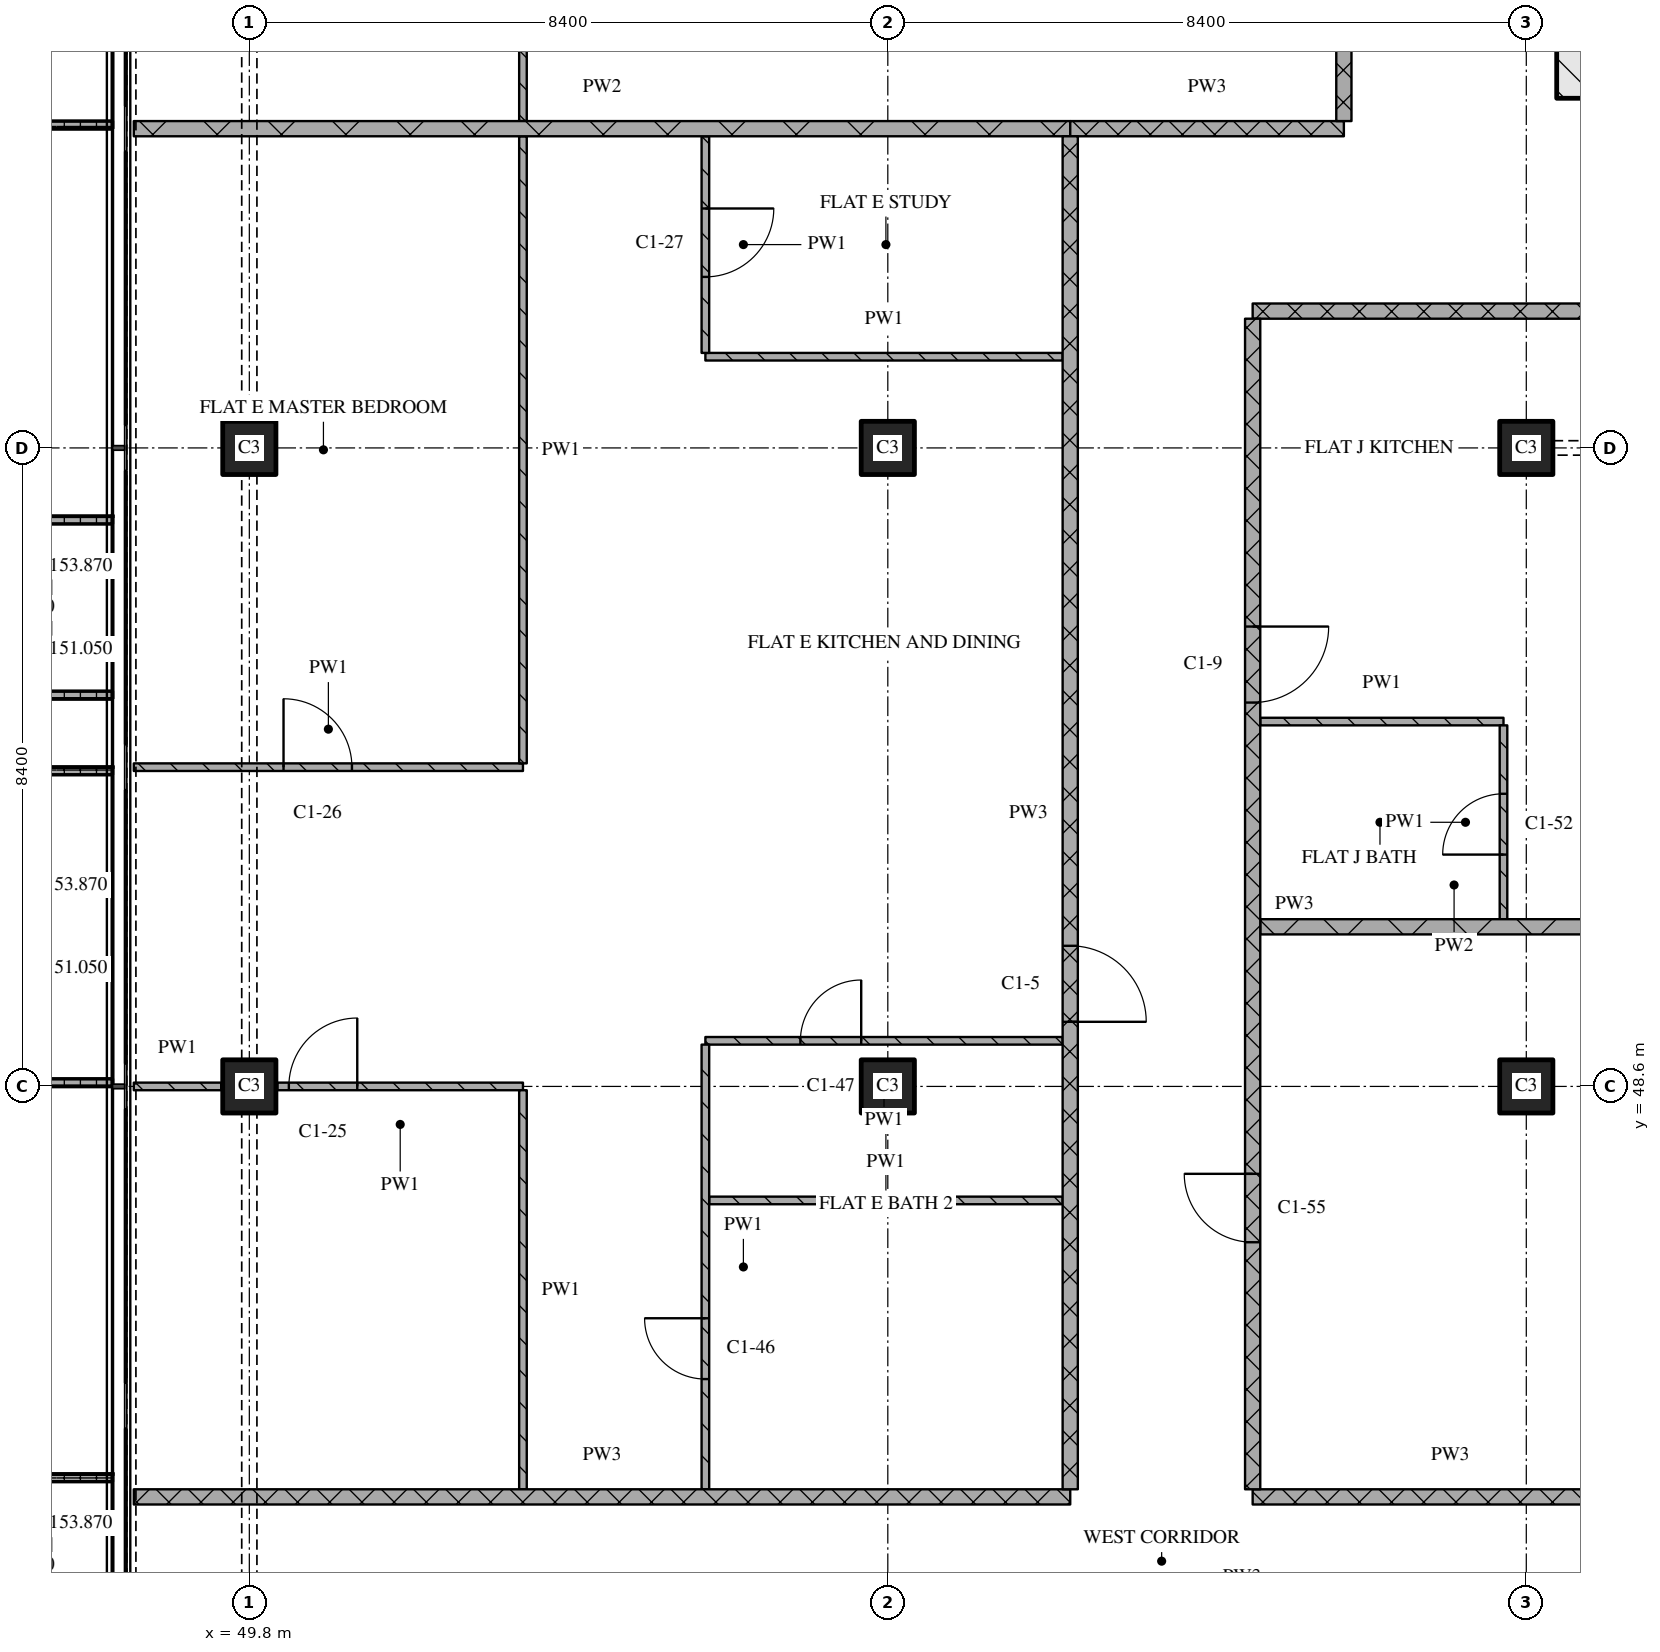
"""IFC4 building model, lengths in metres.
Left out: names, types, materials, properties, quantities, classifications, styles, units other than length and angle.
Written with IfcOpenShell. Run it as: python <this file> out.ifc"""

import sys

from ifc_helpers import new_model, si_unit, direction, frame, frame_2d, origin, origin_2d, place, context, subcontext, project, spatial, polyline, rectangle, outline, extrude, element, fill, save


model = new_model("IFC4")
c1 = context("Model", 3, precision=1e-05, world=origin(), true_north=direction((0.0, 1.0)))
c2 = subcontext(c1, "Body", "Model", "MODEL_VIEW")
j1 = project(units=[si_unit("LENGTHUNIT", "METRE"), si_unit("PLANEANGLEUNIT", "RADIAN")], contexts=[c1])
p1 = place(None, origin())
s1 = spatial("IfcSite", under=j1, at=p1, CompositionType="ELEMENT")
p2 = place(p1, origin())
s2 = spatial("IfcBuilding", under=s1, at=p2, CompositionType="ELEMENT")
p3 = place(p2, frame((0.0, 0.0, 151.05)))
s3 = spatial("IfcBuildingStorey", under=s2, at=p3, CompositionType="ELEMENT", Elevation=151.05)
for number, where, z_axis, x_axis in (
    (1, (49.8, 48.6, 0.0), (0.0, 0.0, 1.0), (1.0, 0.0, 0.0)),
    (2, (49.8, 57.0, 0.0), (0.0, 0.0, 1.0), (1.0, 0.0, 0.0)),
    (3, (58.2, 48.6, 0.0), (0.0, 0.0, 1.0), (1.0, 0.0, 0.0)),
    (4, (58.2, 57.0, 0.0), (0.0, 0.0, 1.0), (1.0, 0.0, 0.0)),
    (5, (66.6, 48.6, 0.0), (0.0, 0.0, 1.0), (1.0, 0.0, 0.0)),
    (6, (66.6, 57.0, 0.0), (0.0, 0.0, 1.0), (1.0, 0.0, 0.0)),
):
    element("IfcColumn", number, at=place(p3, frame(where, z_axis=z_axis, x_axis=x_axis)), inside=s3, PredefinedType="COLUMN", context=c2, shape_type="SweptSolid", body=[
        extrude(rectangle(XDim=0.7, YDim=0.7, at=origin_2d()), origin(), (0.0, 0.0, 1.0), 3.6),
    ])
p4 = place(p3, origin())
e7 = element("IfcWall", 7, at=p4, inside=s3, PredefinedType="SOLIDWALL", context=c2, shape_type="SweptSolid", body=[
    extrude(outline(polyline([(48.0, 65.4), (48.0, 65.3), (46.367, 65.3), (46.367, 61.3), (48.0, 61.3), (48.0, 61.2), (46.267, 61.2), (46.267, 65.4), (48.0, 65.4)])), origin(), (0.0, 0.0, 1.0), 1.0),
])
p5 = place(p3, origin())
e8 = element("IfcWall", 8, at=p5, inside=s3, PredefinedType="SOLIDWALL", context=c2, shape_type="SweptSolid", body=[
    extrude(outline(polyline([(48.0, 56.1), (48.0, 56.0), (46.5, 56.0), (46.5, 53.8), (48.0, 53.8), (48.0, 53.7), (46.4, 53.7), (46.4, 56.1), (48.0, 56.1)])), origin(), (0.0, 0.0, 1.0), 1.0),
])
p6 = place(p3, origin())
e9 = element("IfcWall", 9, at=p6, inside=s3, PredefinedType="SOLIDWALL", context=c2, shape_type="SweptSolid", body=[
    extrude(outline(polyline([(48.0, 52.8), (48.0, 52.7), (46.367, 52.7), (46.367, 48.7), (48.0, 48.7), (48.0, 48.6), (46.267, 48.6), (46.267, 52.8), (48.0, 52.8)])), origin(), (0.0, 0.0, 1.0), 1.0),
])
p7 = place(p3, origin())
e10 = element("IfcWall", 10, at=p7, inside=s3, PredefinedType="SOLIDWALL", context=c2, shape_type="SweptSolid", body=[
    extrude(outline(polyline([(48.0, 43.5), (48.0, 43.4), (46.5, 43.4), (46.5, 41.2), (48.0, 41.2), (48.0, 41.1), (46.4, 41.1), (46.4, 43.5), (48.0, 43.5)])), origin(), (0.0, 0.0, 1.0), 1.0),
])
p8 = place(p3, frame((67.0, 62.0, 0.0), z_axis=(0.0, 0.0, 1.0), x_axis=(1.0, 0.0, 0.0)))
e11 = element("IfcWall", 11, at=p8, inside=s3, PredefinedType="SOLIDWALL", context=c2, shape_type="SweptSolid", body=[
    extrude(rectangle(XDim=41.2, YDim=0.8, at=frame_2d((20.6, 0.0))), origin(), (0.0, 0.0, 1.0), 3.32),
])
p9 = place(p8, frame((20.95, 0.0, 0.0)))
e12 = element("IfcOpeningElement", 12, at=p9, cuts=e11, PredefinedType="OPENING", context=c2, shape_type="SweptSolid", body=[
    extrude(rectangle(XDim=1.8, YDim=2.1, at=frame_2d((0.9, 1.05))), frame((0.0, 0.41, 0.0), z_axis=(0.0, -1.0, 0.0), x_axis=(1.0, 0.0, 0.0)), (0.0, 0.0, 1.0), 0.82),
])
p10 = place(p3, frame((48.28, 43.2, 0.0), z_axis=(0.0, 0.0, 1.0), x_axis=(1.0, 0.0, 0.0)))
e13 = element("IfcWall", 13, at=p10, inside=s3, PredefinedType="PARTITIONING", context=c2, shape_type="SweptSolid", body=[
    extrude(rectangle(XDim=12.32, YDim=0.2, at=frame_2d((6.16, 0.0))), origin(), (0.0, 0.0, 1.0), 3.32),
])
p11 = place(p3, frame((63.0, 43.2, 0.0), z_axis=(0.0, 0.0, 1.0), x_axis=(1.0, 0.0, 0.0)))
e14 = element("IfcWall", 14, at=p11, inside=s3, PredefinedType="PARTITIONING", context=c2, shape_type="SweptSolid", body=[
    extrude(rectangle(XDim=5.2, YDim=0.2, at=frame_2d((2.6, 0.0))), origin(), (0.0, 0.0, 1.0), 3.32),
])
p12 = place(p3, frame((55.85, 47.1, 0.0), z_axis=(0.0, 0.0, 1.0), x_axis=(1.0, 0.0, 0.0)))
e15 = element("IfcWall", 15, at=p12, inside=s3, PredefinedType="PARTITIONING", context=c2, shape_type="SweptSolid", body=[
    extrude(rectangle(XDim=4.65, YDim=0.1, at=frame_2d((2.325, 0.0))), origin(), (0.0, 0.0, 1.0), 3.32),
])
p13 = place(p3, frame((48.28, 48.6, 0.0), z_axis=(0.0, 0.0, 1.0), x_axis=(1.0, 0.0, 0.0)))
e16 = element("IfcWall", 16, at=p13, inside=s3, PredefinedType="PARTITIONING", context=c2, shape_type="SweptSolid", body=[
    extrude(rectangle(XDim=1.15, YDim=0.1, at=frame_2d((0.575, 0.0))), origin(), (0.0, 0.0, 1.0), 3.32),
])
p14 = place(p3, frame((53.4, 48.6, 0.0), z_axis=(0.0, 0.0, 1.0), x_axis=(-1.0, 0.0, 0.0)))
e17 = element("IfcWall", 17, at=p14, inside=s3, PredefinedType="PARTITIONING", context=c2, shape_type="SweptSolid", body=[
    extrude(rectangle(XDim=3.23, YDim=0.1, at=frame_2d((1.615, 0.0))), origin(), (0.0, 0.0, 1.0), 3.32),
])
p15 = place(p14, frame((2.18, 0.0, 0.0)))
e18 = element("IfcOpeningElement", 18, at=p15, cuts=e17, PredefinedType="OPENING", context=c2, shape_type="SweptSolid", body=[
    extrude(rectangle(XDim=0.9, YDim=2.1, at=frame_2d((0.45, 1.05))), frame((0.0, 0.06, 0.0), z_axis=(0.0, -1.0, 0.0), x_axis=(1.0, 0.0, 0.0)), (0.0, 0.0, 1.0), 0.12),
])
p16 = place(p3, frame((60.5, 49.2, 0.0), z_axis=(0.0, 0.0, 1.0), x_axis=(-1.0, 0.0, 0.0)))
e19 = element("IfcWall", 19, at=p16, inside=s3, PredefinedType="PARTITIONING", context=c2, shape_type="SweptSolid", body=[
    extrude(rectangle(XDim=4.7, YDim=0.1, at=frame_2d((2.35, 0.0))), origin(), (0.0, 0.0, 1.0), 3.32),
])
p17 = place(p16, frame((2.65, 0.0, 0.0)))
e20 = element("IfcOpeningElement", 20, at=p17, cuts=e19, PredefinedType="OPENING", context=c2, shape_type="SweptSolid", body=[
    extrude(rectangle(XDim=0.8, YDim=2.1, at=frame_2d((0.4, 1.05))), frame((0.0, 0.06, 0.0), z_axis=(0.0, -1.0, 0.0), x_axis=(1.0, 0.0, 0.0)), (0.0, 0.0, 1.0), 0.12),
])
p18 = place(p3, frame((63.1, 50.7, 0.0), z_axis=(0.0, 0.0, 1.0), x_axis=(1.0, 0.0, 0.0)))
e21 = element("IfcWall", 21, at=p18, inside=s3, PredefinedType="PARTITIONING", context=c2, shape_type="SweptSolid", body=[
    extrude(rectangle(XDim=5.1, YDim=0.2, at=frame_2d((2.55, 0.0))), origin(), (0.0, 0.0, 1.0), 3.32),
])
p19 = place(p3, frame((48.28, 52.8, 0.0), z_axis=(0.0, 0.0, 1.0), x_axis=(1.0, 0.0, 0.0)))
e22 = element("IfcWall", 22, at=p19, inside=s3, PredefinedType="PARTITIONING", context=c2, shape_type="SweptSolid", body=[
    extrude(rectangle(XDim=5.12, YDim=0.1, at=frame_2d((2.56, 0.0))), origin(), (0.0, 0.0, 1.0), 3.32),
])
p20 = place(p19, frame((1.97, 0.0, 0.0)))
e23 = element("IfcOpeningElement", 23, at=p20, cuts=e22, PredefinedType="OPENING", context=c2, shape_type="SweptSolid", body=[
    extrude(rectangle(XDim=0.9, YDim=2.1, at=frame_2d((0.45, 1.05))), frame((0.0, 0.06, 0.0), z_axis=(0.0, -1.0, 0.0), x_axis=(1.0, 0.0, 0.0)), (0.0, 0.0, 1.0), 0.12),
])
p21 = place(p3, frame((63.1, 53.4, 0.0), z_axis=(0.0, 0.0, 1.0), x_axis=(1.0, 0.0, 0.0)))
e24 = element("IfcWall", 24, at=p21, inside=s3, PredefinedType="PARTITIONING", context=c2, shape_type="SweptSolid", body=[
    extrude(rectangle(XDim=3.2, YDim=0.1, at=frame_2d((1.6, 0.0))), origin(), (0.0, 0.0, 1.0), 3.32),
])
p22 = place(p3, frame((55.8, 58.2, 0.0), z_axis=(0.0, 0.0, 1.0), x_axis=(1.0, 0.0, 0.0)))
e25 = element("IfcWall", 25, at=p22, inside=s3, PredefinedType="PARTITIONING", context=c2, shape_type="SweptSolid", body=[
    extrude(rectangle(XDim=4.7, YDim=0.1, at=frame_2d((2.35, 0.0))), origin(), (0.0, 0.0, 1.0), 3.32),
])
p23 = place(p3, frame((63.0, 58.8, 0.0), z_axis=(0.0, 0.0, 1.0), x_axis=(1.0, 0.0, 0.0)))
e26 = element("IfcWall", 26, at=p23, inside=s3, PredefinedType="PARTITIONING", context=c2, shape_type="SweptSolid", body=[
    extrude(rectangle(XDim=10.8, YDim=0.2, at=frame_2d((5.4, 0.0))), origin(), (0.0, 0.0, 1.0), 3.32),
])
p24 = place(p3, frame((60.6, 61.2, 0.0), z_axis=(0.0, 0.0, 1.0), x_axis=(1.0, 0.0, 0.0)))
e27 = element("IfcWall", 27, at=p24, inside=s3, PredefinedType="PARTITIONING", context=c2, shape_type="SweptSolid", body=[
    extrude(rectangle(XDim=3.6, YDim=0.2, at=frame_2d((1.8, 0.0))), origin(), (0.0, 0.0, 1.0), 3.32),
])
p25 = place(p3, frame((48.28, 61.2, 0.0), z_axis=(0.0, 0.0, 1.0), x_axis=(1.0, 0.0, 0.0)))
e28 = element("IfcWall", 28, at=p25, inside=s3, PredefinedType="PARTITIONING", context=c2, shape_type="SweptSolid", body=[
    extrude(rectangle(XDim=12.32, YDim=0.2, at=frame_2d((6.16, 0.0))), origin(), (0.0, 0.0, 1.0), 3.32),
])
p26 = place(p3, frame((53.4, 48.55, 0.0), z_axis=(0.0, 0.0, 1.0), x_axis=(0.0, -1.0, 0.0)))
e29 = element("IfcWall", 29, at=p26, inside=s3, PredefinedType="PARTITIONING", context=c2, shape_type="SweptSolid", body=[
    extrude(rectangle(XDim=5.25, YDim=0.1, at=frame_2d((2.625, 0.0))), origin(), (0.0, 0.0, 1.0), 3.32),
])
p27 = place(p3, frame((55.8, 49.15, 0.0), z_axis=(0.0, 0.0, 1.0), x_axis=(0.0, -1.0, 0.0)))
e30 = element("IfcWall", 30, at=p27, inside=s3, PredefinedType="PARTITIONING", context=c2, shape_type="SweptSolid", body=[
    extrude(rectangle(XDim=5.85, YDim=0.1, at=frame_2d((2.925, 0.0))), origin(), (0.0, 0.0, 1.0), 3.32),
])
p28 = place(p27, frame((3.6, 0.0, 0.0)))
e31 = element("IfcOpeningElement", 31, at=p28, cuts=e30, PredefinedType="OPENING", context=c2, shape_type="SweptSolid", body=[
    extrude(rectangle(XDim=0.8, YDim=2.1, at=frame_2d((0.4, 1.05))), frame((0.0, 0.06, 0.0), z_axis=(0.0, -1.0, 0.0), x_axis=(1.0, 0.0, 0.0)), (0.0, 0.0, 1.0), 0.12),
])
p29 = place(p3, frame((55.8, 61.1, 0.0), z_axis=(0.0, 0.0, 1.0), x_axis=(0.0, -1.0, 0.0)))
e32 = element("IfcWall", 32, at=p29, inside=s3, PredefinedType="PARTITIONING", context=c2, shape_type="SweptSolid", body=[
    extrude(rectangle(XDim=2.85, YDim=0.1, at=frame_2d((1.425, 0.0))), origin(), (0.0, 0.0, 1.0), 3.32),
])
p30 = place(p29, frame((0.95, 0.0, 0.0)))
e33 = element("IfcOpeningElement", 33, at=p30, cuts=e32, PredefinedType="OPENING", context=c2, shape_type="SweptSolid", body=[
    extrude(rectangle(XDim=0.9, YDim=2.1, at=frame_2d((0.45, 1.05))), frame((0.0, 0.06, 0.0), z_axis=(0.0, -1.0, 0.0), x_axis=(1.0, 0.0, 0.0)), (0.0, 0.0, 1.0), 0.12),
])
p31 = place(p3, frame((60.6, 43.3, 0.0), z_axis=(0.0, 0.0, 1.0), x_axis=(0.0, 1.0, 0.0)))
e34 = element("IfcWall", 34, at=p31, inside=s3, PredefinedType="PARTITIONING", context=c2, shape_type="SweptSolid", body=[
    extrude(rectangle(XDim=17.8, YDim=0.2, at=frame_2d((8.9, 0.0))), origin(), (0.0, 0.0, 1.0), 3.32),
])
p32 = place(p31, frame((6.15, 0.0, 0.0)))
e35 = element("IfcOpeningElement", 35, at=p32, cuts=e34, PredefinedType="OPENING", context=c2, shape_type="SweptSolid", body=[
    extrude(rectangle(XDim=1.0, YDim=2.1, at=frame_2d((0.5, 1.05))), frame((0.0, 0.11, 0.0), z_axis=(0.0, -1.0, 0.0), x_axis=(1.0, 0.0, 0.0)), (0.0, 0.0, 1.0), 0.22),
])
p33 = place(p3, frame((63.0, 58.7, 0.0), z_axis=(0.0, 0.0, 1.0), x_axis=(0.0, -1.0, 0.0)))
e36 = element("IfcWall", 36, at=p33, inside=s3, PredefinedType="PARTITIONING", context=c2, shape_type="SweptSolid", body=[
    extrude(rectangle(XDim=15.4, YDim=0.2, at=frame_2d((7.7, 0.0))), origin(), (0.0, 0.0, 1.0), 3.32),
])
p34 = place(p33, frame((4.05, 0.0, 0.0)))
e37 = element("IfcOpeningElement", 37, at=p34, cuts=e36, PredefinedType="OPENING", context=c2, shape_type="SweptSolid", body=[
    extrude(rectangle(XDim=1.0, YDim=2.1, at=frame_2d((0.5, 1.05))), frame((0.0, 0.11, 0.0), z_axis=(0.0, -1.0, 0.0), x_axis=(1.0, 0.0, 0.0)), (0.0, 0.0, 1.0), 0.22),
])
p35 = place(p33, frame((11.25, 0.0, 0.0)))
e38 = element("IfcOpeningElement", 38, at=p35, cuts=e36, PredefinedType="OPENING", context=c2, shape_type="SweptSolid", body=[
    extrude(rectangle(XDim=0.9, YDim=2.1, at=frame_2d((0.45, 1.05))), frame((0.0, 0.11, 0.0), z_axis=(0.0, -1.0, 0.0), x_axis=(1.0, 0.0, 0.0)), (0.0, 0.0, 1.0), 0.22),
])
p36 = place(p3, frame((64.2, 61.3, 0.0), z_axis=(0.0, 0.0, 1.0), x_axis=(0.0, 1.0, 0.0)))
e39 = element("IfcWall", 39, at=p36, inside=s3, PredefinedType="PARTITIONING", context=c2, shape_type="SweptSolid", body=[
    extrude(rectangle(XDim=14.02, YDim=0.2, at=frame_2d((7.01, 0.0))), origin(), (0.0, 0.0, 1.0), 3.32),
])
p37 = place(p36, frame((6.75, 0.0, 0.0)))
e40 = element("IfcOpeningElement", 40, at=p37, cuts=e39, PredefinedType="OPENING", context=c2, shape_type="SweptSolid", body=[
    extrude(rectangle(XDim=1.0, YDim=2.1, at=frame_2d((0.5, 1.05))), frame((0.0, 0.11, 0.0), z_axis=(0.0, -1.0, 0.0), x_axis=(1.0, 0.0, 0.0)), (0.0, 0.0, 1.0), 0.22),
])
p38 = place(p3, frame((66.3, 50.8, 0.0), z_axis=(0.0, 0.0, 1.0), x_axis=(0.0, 1.0, 0.0)))
e41 = element("IfcWall", 41, at=p38, inside=s3, PredefinedType="PARTITIONING", context=c2, shape_type="SweptSolid", body=[
    extrude(rectangle(XDim=2.55, YDim=0.1, at=frame_2d((1.275, 0.0))), origin(), (0.0, 0.0, 1.0), 3.32),
])
p39 = place(p38, frame((0.85, 0.0, 0.0)))
e42 = element("IfcOpeningElement", 42, at=p39, cuts=e41, PredefinedType="OPENING", context=c2, shape_type="SweptSolid", body=[
    extrude(rectangle(XDim=0.8, YDim=2.1, at=frame_2d((0.4, 1.05))), frame((0.0, 0.06, 0.0), z_axis=(0.0, -1.0, 0.0), x_axis=(1.0, 0.0, 0.0)), (0.0, 0.0, 1.0), 0.12),
])
p40 = place(p3, frame((53.4, 61.1, 0.0), z_axis=(0.0, 0.0, 1.0), x_axis=(0.0, -1.0, 0.0)))
e43 = element("IfcWall", 43, at=p40, inside=s3, PredefinedType="PARTITIONING", context=c2, shape_type="SweptSolid", body=[
    extrude(rectangle(XDim=8.25, YDim=0.1, at=frame_2d((4.125, 0.0))), origin(), (0.0, 0.0, 1.0), 3.32),
])
p41 = place(p3, frame((53.4, 61.3, 0.0), z_axis=(0.0, 0.0, 1.0), x_axis=(0.0, 1.0, 0.0)))
e44 = element("IfcWall", 44, at=p41, inside=s3, PredefinedType="PARTITIONING", context=c2, shape_type="SweptSolid", body=[
    extrude(rectangle(XDim=8.25, YDim=0.1, at=frame_2d((4.125, 0.0))), origin(), (0.0, 0.0, 1.0), 3.32),
])
p42 = place(p41, frame((3.65, 0.0, 0.0)))
e45 = element("IfcOpeningElement", 45, at=p42, cuts=e44, PredefinedType="OPENING", context=c2, shape_type="SweptSolid", body=[
    extrude(rectangle(XDim=0.9, YDim=2.1, at=frame_2d((0.45, 1.05))), frame((0.0, 0.06, 0.0), z_axis=(0.0, -1.0, 0.0), x_axis=(1.0, 0.0, 0.0)), (0.0, 0.0, 1.0), 0.12),
])
p43 = place(p15, origin())
e46 = element("IfcDoor", 46, at=p43, inside=s3, OperationType="SINGLE_SWING_RIGHT", PredefinedType="DOOR", context=c2, shape_type="SweptSolid", body=[
    extrude(rectangle(XDim=0.9, YDim=2.1, at=frame_2d((0.45, 1.05))), frame((0.0, 0.025, 0.0), z_axis=(0.0, -1.0, 0.0), x_axis=(1.0, 0.0, 0.0)), (0.0, 0.0, 1.0), 0.05),
])
fill(e18, e46)
p44 = place(p17, origin())
e47 = element("IfcDoor", 47, at=p44, inside=s3, OperationType="SINGLE_SWING_RIGHT", PredefinedType="DOOR", context=c2, shape_type="SweptSolid", body=[
    extrude(rectangle(XDim=0.8, YDim=2.1, at=frame_2d((0.4, 1.05))), frame((0.0, 0.025, 0.0), z_axis=(0.0, -1.0, 0.0), x_axis=(1.0, 0.0, 0.0)), (0.0, 0.0, 1.0), 0.05),
])
fill(e20, e47)
p45 = place(p20, origin())
e48 = element("IfcDoor", 48, at=p45, inside=s3, OperationType="SINGLE_SWING_LEFT", PredefinedType="DOOR", context=c2, shape_type="SweptSolid", body=[
    extrude(rectangle(XDim=0.9, YDim=2.1, at=frame_2d((0.45, 1.05))), frame((0.0, 0.025, 0.0), z_axis=(0.0, -1.0, 0.0), x_axis=(1.0, 0.0, 0.0)), (0.0, 0.0, 1.0), 0.05),
])
fill(e23, e48)
p46 = place(p28, origin())
e49 = element("IfcDoor", 49, at=p46, inside=s3, OperationType="SINGLE_SWING_RIGHT", PredefinedType="DOOR", context=c2, shape_type="SweptSolid", body=[
    extrude(rectangle(XDim=0.8, YDim=2.1, at=frame_2d((0.4, 1.05))), frame((0.0, 0.025, 0.0), z_axis=(0.0, -1.0, 0.0), x_axis=(1.0, 0.0, 0.0)), (0.0, 0.0, 1.0), 0.05),
])
fill(e31, e49)
p47 = place(p30, origin())
e50 = element("IfcDoor", 50, at=p47, inside=s3, OperationType="SINGLE_SWING_LEFT", PredefinedType="DOOR", context=c2, shape_type="SweptSolid", body=[
    extrude(rectangle(XDim=0.9, YDim=2.1, at=frame_2d((0.45, 1.05))), frame((0.0, 0.025, 0.0), z_axis=(0.0, -1.0, 0.0), x_axis=(1.0, 0.0, 0.0)), (0.0, 0.0, 1.0), 0.05),
])
fill(e33, e50)
p48 = place(p32, origin())
e51 = element("IfcDoor", 51, at=p48, inside=s3, OperationType="SINGLE_SWING_RIGHT", PredefinedType="DOOR", context=c2, shape_type="SweptSolid", body=[
    extrude(rectangle(XDim=1.0, YDim=2.1, at=frame_2d((0.5, 1.05))), frame((0.0, 0.025, 0.0), z_axis=(0.0, -1.0, 0.0), x_axis=(1.0, 0.0, 0.0)), (0.0, 0.0, 1.0), 0.05),
])
fill(e35, e51)
p49 = place(p34, origin())
e52 = element("IfcDoor", 52, at=p49, inside=s3, OperationType="SINGLE_SWING_LEFT", PredefinedType="DOOR", context=c2, shape_type="SweptSolid", body=[
    extrude(rectangle(XDim=1.0, YDim=2.1, at=frame_2d((0.5, 1.05))), frame((0.0, 0.025, 0.0), z_axis=(0.0, -1.0, 0.0), x_axis=(1.0, 0.0, 0.0)), (0.0, 0.0, 1.0), 0.05),
])
fill(e37, e52)
p50 = place(p35, origin())
e53 = element("IfcDoor", 53, at=p50, inside=s3, OperationType="SINGLE_SWING_RIGHT", PredefinedType="DOOR", context=c2, shape_type="SweptSolid", body=[
    extrude(rectangle(XDim=0.9, YDim=2.1, at=frame_2d((0.45, 1.05))), frame((0.0, 0.025, 0.0), z_axis=(0.0, -1.0, 0.0), x_axis=(1.0, 0.0, 0.0)), (0.0, 0.0, 1.0), 0.05),
])
fill(e38, e53)
p51 = place(p39, origin())
e54 = element("IfcDoor", 54, at=p51, inside=s3, OperationType="SINGLE_SWING_LEFT", PredefinedType="DOOR", context=c2, shape_type="SweptSolid", body=[
    extrude(rectangle(XDim=0.8, YDim=2.1, at=frame_2d((0.4, 1.05))), frame((0.0, 0.025, 0.0), z_axis=(0.0, -1.0, 0.0), x_axis=(1.0, 0.0, 0.0)), (0.0, 0.0, 1.0), 0.05),
])
fill(e42, e54)
save(model, sys.argv[1])
